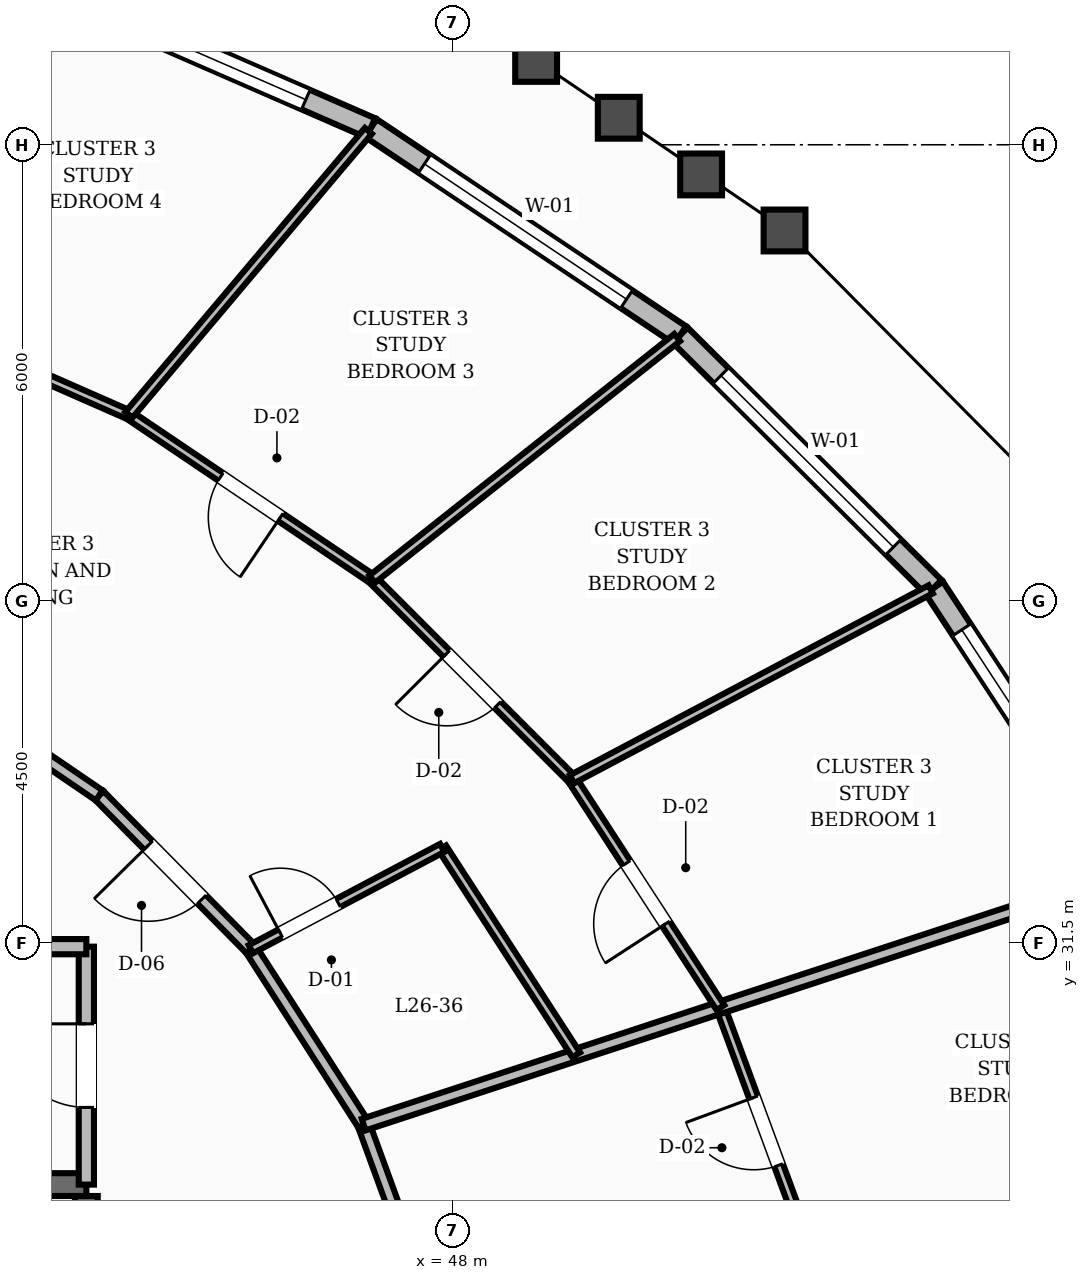
"""IFC4 building model, lengths in metres.
Left out: names, types, materials, properties, quantities, classifications, styles, units other than length and angle.
Written with IfcOpenShell. Run it as: python <this file> out.ifc"""

import sys

from ifc_helpers import new_model, si_unit, direction, frame, frame_2d, origin, place, context, subcontext, project, spatial, rectangle, extrude, element, fill, save


model = new_model("IFC4")
c1 = context("Model", 3, precision=1e-05, world=origin(), true_north=direction((0.0, 1.0)))
c2 = subcontext(c1, "Body", "Model", "MODEL_VIEW")
j1 = project(units=[si_unit("LENGTHUNIT", "METRE"), si_unit("PLANEANGLEUNIT", "RADIAN")], contexts=[c1])
p1 = place(None, origin())
s1 = spatial("IfcSite", under=j1, at=p1, CompositionType="ELEMENT")
p2 = place(p1, origin())
s2 = spatial("IfcBuilding", under=s1, at=p2, CompositionType="ELEMENT")
p3 = place(p2, frame((0.0, 0.0, 102.4)))
s3 = spatial("IfcBuildingStorey", under=s2, at=p3, CompositionType="ELEMENT", Elevation=102.4)
p4 = place(p3, frame((43.18, 19.43, 0.0), z_axis=(0.0, 0.0, 1.0), x_axis=(0.0, 1.0, 0.0)))
e1 = element("IfcWall", 1, at=p4, inside=s3, PredefinedType="SHEAR", context=c2, shape_type="SweptSolid", body=[
    extrude(rectangle(XDim=8.74, YDim=0.3, at=frame_2d((4.37, 0.0))), origin(), (0.0, 0.0, 1.0), 3.6),
])
p5 = place(p3, frame((39.58, 28.32, 0.0), z_axis=(0.0, 0.0, 1.0), x_axis=(1.0, 0.0, 0.0)))
e2 = element("IfcWall", 2, at=p5, inside=s3, PredefinedType="SHEAR", context=c2, shape_type="SweptSolid", body=[
    extrude(rectangle(XDim=3.6, YDim=0.3, at=frame_2d((1.8, 0.0))), origin(), (0.0, 0.0, 1.0), 3.6),
])
p6 = place(p5, frame((1.3, 0.0, 0.0)))
e3 = element("IfcOpeningElement", 3, at=p6, cuts=e2, PredefinedType="OPENING", context=c2, shape_type="SweptSolid", body=[
    extrude(rectangle(XDim=1.1, YDim=2.1, at=frame_2d((0.55, 1.05))), frame((0.0, 0.16, 0.0), z_axis=(0.0, -1.0, 0.0), x_axis=(1.0, 0.0, 0.0)), (0.0, 0.0, 1.0), 0.32),
])
p7 = place(p3, frame((56.815, 32.386, 0.0), z_axis=(0.0, 0.0, 1.0), x_axis=(-0.547989842324, 0.836484986542, 0.0)))
e4 = element("IfcWall", 4, at=p7, inside=s3, PredefinedType="STANDARD", context=c2, shape_type="SweptSolid", body=[
    extrude(rectangle(XDim=4.529, YDim=0.28, at=frame_2d((2.265, 0.0))), origin(), (0.0, 0.0, 1.0), 2.67),
])
p8 = place(p7, frame((0.665, 0.0, 0.8)))
e5 = element("IfcOpeningElement", 5, at=p8, cuts=e4, PredefinedType="OPENING", context=c2, shape_type="SweptSolid", body=[
    extrude(rectangle(XDim=3.2, YDim=1.65, at=frame_2d((1.6, 0.825))), frame((0.0, 0.15, 0.0), z_axis=(0.0, -1.0, 0.0), x_axis=(1.0, 0.0, 0.0)), (0.0, 0.0, 1.0), 0.3),
])
p9 = place(p3, frame((54.333, 36.175, 0.0), z_axis=(0.0, 0.0, 1.0), x_axis=(-0.709177055594, 0.705030427583, 0.0)))
e6 = element("IfcWall", 6, at=p9, inside=s3, PredefinedType="STANDARD", context=c2, shape_type="SweptSolid", body=[
    extrude(rectangle(XDim=4.71, YDim=0.28, at=frame_2d((2.355, 0.0))), origin(), (0.0, 0.0, 1.0), 2.67),
])
p10 = place(p9, frame((0.755, 0.0, 0.8)))
e7 = element("IfcOpeningElement", 7, at=p10, cuts=e6, PredefinedType="OPENING", context=c2, shape_type="SweptSolid", body=[
    extrude(rectangle(XDim=3.2, YDim=1.65, at=frame_2d((1.6, 0.825))), frame((0.0, 0.15, 0.0), z_axis=(0.0, -1.0, 0.0), x_axis=(1.0, 0.0, 0.0)), (0.0, 0.0, 1.0), 0.3),
])
p11 = place(p3, frame((50.993, 39.495, 0.0), z_axis=(0.0, 0.0, 1.0), x_axis=(-0.830936801798, 0.556366813728, 0.0)))
e8 = element("IfcWall", 8, at=p11, inside=s3, PredefinedType="STANDARD", context=c2, shape_type="SweptSolid", body=[
    extrude(rectangle(XDim=4.898, YDim=0.28, at=frame_2d((2.449, 0.0))), origin(), (0.0, 0.0, 1.0), 2.67),
])
p12 = place(p11, frame((0.849, 0.0, 0.8)))
e9 = element("IfcOpeningElement", 9, at=p12, cuts=e8, PredefinedType="OPENING", context=c2, shape_type="SweptSolid", body=[
    extrude(rectangle(XDim=3.2, YDim=1.65, at=frame_2d((1.6, 0.825))), frame((0.0, 0.15, 0.0), z_axis=(0.0, -1.0, 0.0), x_axis=(1.0, 0.0, 0.0)), (0.0, 0.0, 1.0), 0.3),
])
p13 = place(p3, frame((46.922, 42.221, 0.0), z_axis=(0.0, 0.0, 1.0), x_axis=(-0.916638922048, 0.399716257596, 0.0)))
e10 = element("IfcWall", 10, at=p13, inside=s3, PredefinedType="STANDARD", context=c2, shape_type="SweptSolid", body=[
    extrude(rectangle(XDim=5.066, YDim=0.28, at=frame_2d((2.533, 0.0))), origin(), (0.0, 0.0, 1.0), 2.67),
])
p14 = place(p13, frame((0.933, 0.0, 0.8)))
e11 = element("IfcOpeningElement", 11, at=p14, cuts=e10, PredefinedType="OPENING", context=c2, shape_type="SweptSolid", body=[
    extrude(rectangle(XDim=3.2, YDim=1.65, at=frame_2d((1.6, 0.825))), frame((0.0, 0.15, 0.0), z_axis=(0.0, -1.0, 0.0), x_axis=(1.0, 0.0, 0.0)), (0.0, 0.0, 1.0), 0.3),
])
p15 = place(p3, frame((43.18, 28.32, 0.0), z_axis=(0.0, 0.0, 1.0), x_axis=(0.0, 1.0, 0.0)))
e12 = element("IfcWall", 12, at=p15, inside=s3, PredefinedType="SOLIDWALL", context=c2, shape_type="SweptSolid", body=[
    extrude(rectangle(XDim=3.13, YDim=0.2, at=frame_2d((1.565, 0.0))), origin(), (0.0, 0.0, 1.0), 2.67),
])
p16 = place(p15, frame((1.015, 0.0, 0.0)))
e13 = element("IfcOpeningElement", 13, at=p16, cuts=e12, PredefinedType="OPENING", context=c2, shape_type="SweptSolid", body=[
    extrude(rectangle(XDim=1.1, YDim=2.1, at=frame_2d((0.55, 1.05))), frame((0.0, 0.11, 0.0), z_axis=(0.0, -1.0, 0.0), x_axis=(1.0, 0.0, 0.0)), (0.0, 0.0, 1.0), 0.22),
])
p17 = place(p3, frame((39.2, 31.45, 0.0), z_axis=(0.0, 0.0, 1.0), x_axis=(1.0, 0.0, 0.0)))
e14 = element("IfcWall", 14, at=p17, inside=s3, PredefinedType="SOLIDWALL", context=c2, shape_type="SweptSolid", body=[
    extrude(rectangle(XDim=3.98, YDim=0.2, at=frame_2d((1.99, 0.0))), origin(), (0.0, 0.0, 1.0), 2.67),
])
p18 = place(p3, frame((47.742, 26.604, 0.0), z_axis=(0.0, 0.0, 1.0), x_axis=(-0.342617982381, 0.939474809747, 0.0)))
e15 = element("IfcWall", 15, at=p18, inside=s3, PredefinedType="SOLIDWALL", context=c2, shape_type="SweptSolid", body=[
    extrude(rectangle(XDim=2.666, YDim=0.16, at=frame_2d((1.333, 0.0))), origin(), (0.0, 0.0, 1.0), 2.67),
])
p19 = place(p3, frame((46.828, 29.109, 0.0), z_axis=(0.0, 0.0, 1.0), x_axis=(-0.540595670038, 0.841282545603, 0.0)))
e16 = element("IfcWall", 16, at=p19, inside=s3, PredefinedType="SOLIDWALL", context=c2, shape_type="SweptSolid", body=[
    extrude(rectangle(XDim=2.744, YDim=0.16, at=frame_2d((1.372, 0.0))), origin(), (0.0, 0.0, 1.0), 2.67),
])
p20 = place(p3, frame((45.345, 31.417, 0.0), z_axis=(0.0, 0.0, 1.0), x_axis=(-0.702366174226, 0.711815816981, 0.0)))
e17 = element("IfcWall", 17, at=p20, inside=s3, PredefinedType="SOLIDWALL", context=c2, shape_type="SweptSolid", body=[
    extrude(rectangle(XDim=2.842, YDim=0.16, at=frame_2d((1.421, 0.0))), origin(), (0.0, 0.0, 1.0), 2.67),
])
p21 = place(p20, frame((0.921, 0.0, 0.0)))
e18 = element("IfcOpeningElement", 18, at=p21, cuts=e17, PredefinedType="OPENING", context=c2, shape_type="SweptSolid", body=[
    extrude(rectangle(XDim=1.0, YDim=2.1, at=frame_2d((0.5, 1.05))), frame((0.0, 0.09, 0.0), z_axis=(0.0, -1.0, 0.0), x_axis=(1.0, 0.0, 0.0)), (0.0, 0.0, 1.0), 0.18),
])
p22 = place(p3, frame((43.349, 33.44, 0.0), z_axis=(0.0, 0.0, 1.0), x_axis=(-0.825929039072, 0.563774088104, 0.0)))
e19 = element("IfcWall", 19, at=p22, inside=s3, PredefinedType="SOLIDWALL", context=c2, shape_type="SweptSolid", body=[
    extrude(rectangle(XDim=2.945, YDim=0.16, at=frame_2d((1.472, 0.0))), origin(), (0.0, 0.0, 1.0), 2.67),
])
p23 = place(p3, frame((52.725, 27.39, 0.0), z_axis=(0.0, 0.0, 1.0), x_axis=(-0.346151450403, 0.938178646839, 0.0)))
e20 = element("IfcWall", 20, at=p23, inside=s3, PredefinedType="PARTITIONING", context=c2, shape_type="SweptSolid", body=[
    extrude(rectangle(XDim=3.474, YDim=0.12, at=frame_2d((1.737, 0.0))), origin(), (0.0, 0.0, 1.0), 2.67),
])
p24 = place(p23, frame((1.262, 0.0, 0.0)))
e21 = element("IfcOpeningElement", 21, at=p24, cuts=e20, PredefinedType="OPENING", context=c2, shape_type="SweptSolid", body=[
    extrude(rectangle(XDim=0.95, YDim=2.1, at=frame_2d((0.475, 1.05))), frame((0.0, 0.07, 0.0), z_axis=(0.0, -1.0, 0.0), x_axis=(1.0, 0.0, 0.0)), (0.0, 0.0, 1.0), 0.14),
])
p25 = place(p3, frame((52.725, 27.39, 0.0), z_axis=(0.0, 0.0, 1.0), x_axis=(0.987809965593, 0.155664613436, 0.0)))
e22 = element("IfcWall", 22, at=p25, inside=s3, PredefinedType="PARTITIONING", context=c2, shape_type="SweptSolid", body=[
    extrude(rectangle(XDim=5.638, YDim=0.12, at=frame_2d((2.819, 0.0))), origin(), (0.0, 0.0, 1.0), 2.67),
])
p26 = place(p3, frame((46.828, 29.109, 0.0), z_axis=(0.0, 0.0, 1.0), x_axis=(0.95015260274, 0.311785232984, 0.0)))
e23 = element("IfcWall", 23, at=p26, inside=s3, PredefinedType="SOLIDWALL", context=c2, shape_type="SweptSolid", body=[
    extrude(rectangle(XDim=10.461, YDim=0.16, at=frame_2d((5.23, 0.0))), origin(), (0.0, 0.0, 1.0), 2.67),
])
p27 = place(p3, frame((49.625, 30.026, 0.0), z_axis=(0.0, 0.0, 1.0), x_axis=(-0.543463490986, 0.839432804914, 0.0)))
e24 = element("IfcWall", 24, at=p27, inside=s3, PredefinedType="PARTITIONING", context=c2, shape_type="SweptSolid", body=[
    extrude(rectangle(XDim=3.243, YDim=0.12, at=frame_2d((1.622, 0.0))), origin(), (0.0, 0.0, 1.0), 2.67),
])
p28 = place(p3, frame((45.345, 31.417, 0.0), z_axis=(0.0, 0.0, 1.0), x_axis=(0.883829625211, 0.467808928517, 0.0)))
e25 = element("IfcWall", 25, at=p28, inside=s3, PredefinedType="PARTITIONING", context=c2, shape_type="SweptSolid", body=[
    extrude(rectangle(XDim=2.847, YDim=0.12, at=frame_2d((1.424, 0.0))), origin(), (0.0, 0.0, 1.0), 2.67),
])
p29 = place(p28, frame((0.44, 0.0, 0.0)))
e26 = element("IfcOpeningElement", 26, at=p29, cuts=e25, PredefinedType="OPENING", context=c2, shape_type="SweptSolid", body=[
    extrude(rectangle(XDim=0.86, YDim=2.1, at=frame_2d((0.43, 1.05))), frame((0.0, 0.07, 0.0), z_axis=(0.0, -1.0, 0.0), x_axis=(1.0, 0.0, 0.0)), (0.0, 0.0, 1.0), 0.14),
])
p30 = place(p3, frame((51.522, 30.649, 0.0), z_axis=(0.0, 0.0, 1.0), x_axis=(-0.545007511922, 0.838431161127, 0.0)))
e27 = element("IfcWall", 27, at=p30, inside=s3, PredefinedType="PARTITIONING", context=c2, shape_type="SweptSolid", body=[
    extrude(rectangle(XDim=3.583, YDim=0.12, at=frame_2d((1.792, 0.0))), origin(), (0.0, 0.0, 1.0), 2.67),
])
p31 = place(p30, frame((1.316, 0.0, 0.0)))
e28 = element("IfcOpeningElement", 28, at=p31, cuts=e27, PredefinedType="OPENING", context=c2, shape_type="SweptSolid", body=[
    extrude(rectangle(XDim=0.95, YDim=2.1, at=frame_2d((0.475, 1.05))), frame((0.0, 0.07, 0.0), z_axis=(0.0, -1.0, 0.0), x_axis=(1.0, 0.0, 0.0)), (0.0, 0.0, 1.0), 0.14),
])
p32 = place(p3, frame((49.569, 33.653, 0.0), z_axis=(0.0, 0.0, 1.0), x_axis=(-0.706450168387, 0.707762784827, 0.0)))
e29 = element("IfcWall", 29, at=p32, inside=s3, PredefinedType="PARTITIONING", context=c2, shape_type="SweptSolid", body=[
    extrude(rectangle(XDim=3.72, YDim=0.12, at=frame_2d((1.86, 0.0))), origin(), (0.0, 0.0, 1.0), 2.67),
])
p33 = place(p32, frame((1.385, 0.0, 0.0)))
e30 = element("IfcOpeningElement", 30, at=p33, cuts=e29, PredefinedType="OPENING", context=c2, shape_type="SweptSolid", body=[
    extrude(rectangle(XDim=0.95, YDim=2.1, at=frame_2d((0.475, 1.05))), frame((0.0, 0.07, 0.0), z_axis=(0.0, -1.0, 0.0), x_axis=(1.0, 0.0, 0.0)), (0.0, 0.0, 1.0), 0.14),
])
p34 = place(p3, frame((49.569, 33.653, 0.0), z_axis=(0.0, 0.0, 1.0), x_axis=(0.883826837668, 0.467814194973, 0.0)))
e31 = element("IfcWall", 31, at=p34, inside=s3, PredefinedType="PARTITIONING", context=c2, shape_type="SweptSolid", body=[
    extrude(rectangle(XDim=5.34, YDim=0.12, at=frame_2d((2.67, 0.0))), origin(), (0.0, 0.0, 1.0), 2.67),
])
p35 = place(p3, frame((46.941, 36.286, 0.0), z_axis=(0.0, 0.0, 1.0), x_axis=(-0.828896296571, 0.55940229668, 0.0)))
e32 = element("IfcWall", 32, at=p35, inside=s3, PredefinedType="PARTITIONING", context=c2, shape_type="SweptSolid", body=[
    extrude(rectangle(XDim=3.863, YDim=0.12, at=frame_2d((1.931, 0.0))), origin(), (0.0, 0.0, 1.0), 2.67),
])
p36 = place(p35, frame((1.456, 0.0, 0.0)))
e33 = element("IfcOpeningElement", 33, at=p36, cuts=e32, PredefinedType="OPENING", context=c2, shape_type="SweptSolid", body=[
    extrude(rectangle(XDim=0.95, YDim=2.1, at=frame_2d((0.475, 1.05))), frame((0.0, 0.07, 0.0), z_axis=(0.0, -1.0, 0.0), x_axis=(1.0, 0.0, 0.0)), (0.0, 0.0, 1.0), 0.14),
])
p37 = place(p3, frame((46.941, 36.286, 0.0), z_axis=(0.0, 0.0, 1.0), x_axis=(0.783824285958, 0.620982679905, 0.0)))
e34 = element("IfcWall", 34, at=p37, inside=s3, PredefinedType="PARTITIONING", context=c2, shape_type="SweptSolid", body=[
    extrude(rectangle(XDim=5.118, YDim=0.12, at=frame_2d((2.559, 0.0))), origin(), (0.0, 0.0, 1.0), 2.67),
])
p38 = place(p3, frame((43.74, 38.447, 0.0), z_axis=(0.0, 0.0, 1.0), x_axis=(-0.915498969217, 0.402320316865, 0.0)))
e35 = element("IfcWall", 35, at=p38, inside=s3, PredefinedType="PARTITIONING", context=c2, shape_type="SweptSolid", body=[
    extrude(rectangle(XDim=3.99, YDim=0.12, at=frame_2d((1.995, 0.0))), origin(), (0.0, 0.0, 1.0), 2.67),
])
p39 = place(p38, frame((1.52, 0.0, 0.0)))
e36 = element("IfcOpeningElement", 36, at=p39, cuts=e35, PredefinedType="OPENING", context=c2, shape_type="SweptSolid", body=[
    extrude(rectangle(XDim=0.95, YDim=2.1, at=frame_2d((0.475, 1.05))), frame((0.0, 0.07, 0.0), z_axis=(0.0, -1.0, 0.0), x_axis=(1.0, 0.0, 0.0)), (0.0, 0.0, 1.0), 0.14),
])
p40 = place(p3, frame((43.74, 38.447, 0.0), z_axis=(0.0, 0.0, 1.0), x_axis=(0.644718627515, 0.764419970524, 0.0)))
e37 = element("IfcWall", 37, at=p40, inside=s3, PredefinedType="PARTITIONING", context=c2, shape_type="SweptSolid", body=[
    extrude(rectangle(XDim=4.887, YDim=0.12, at=frame_2d((2.443, 0.0))), origin(), (0.0, 0.0, 1.0), 2.67),
])
p41 = place(p8, origin())
e38 = element("IfcWindow", 38, at=p41, inside=s3, PartitioningType="SINGLE_PANEL", PredefinedType="WINDOW", context=c2, shape_type="SweptSolid", body=[
    extrude(rectangle(XDim=3.2, YDim=1.65, at=frame_2d((1.6, 0.825))), frame((0.0, 0.03, 0.0), z_axis=(0.0, -1.0, 0.0), x_axis=(1.0, 0.0, 0.0)), (0.0, 0.0, 1.0), 0.06),
])
fill(e5, e38)
p42 = place(p10, origin())
e39 = element("IfcWindow", 39, at=p42, inside=s3, PartitioningType="SINGLE_PANEL", PredefinedType="WINDOW", context=c2, shape_type="SweptSolid", body=[
    extrude(rectangle(XDim=3.2, YDim=1.65, at=frame_2d((1.6, 0.825))), frame((0.0, 0.03, 0.0), z_axis=(0.0, -1.0, 0.0), x_axis=(1.0, 0.0, 0.0)), (0.0, 0.0, 1.0), 0.06),
])
fill(e7, e39)
p43 = place(p12, origin())
e40 = element("IfcWindow", 40, at=p43, inside=s3, PartitioningType="SINGLE_PANEL", PredefinedType="WINDOW", context=c2, shape_type="SweptSolid", body=[
    extrude(rectangle(XDim=3.2, YDim=1.65, at=frame_2d((1.6, 0.825))), frame((0.0, 0.03, 0.0), z_axis=(0.0, -1.0, 0.0), x_axis=(1.0, 0.0, 0.0)), (0.0, 0.0, 1.0), 0.06),
])
fill(e9, e40)
p44 = place(p14, origin())
e41 = element("IfcWindow", 41, at=p44, inside=s3, PartitioningType="SINGLE_PANEL", PredefinedType="WINDOW", context=c2, shape_type="SweptSolid", body=[
    extrude(rectangle(XDim=3.2, YDim=1.65, at=frame_2d((1.6, 0.825))), frame((0.0, 0.03, 0.0), z_axis=(0.0, -1.0, 0.0), x_axis=(1.0, 0.0, 0.0)), (0.0, 0.0, 1.0), 0.06),
])
fill(e11, e41)
p45 = place(p16, origin())
e42 = element("IfcDoor", 42, at=p45, inside=s3, OperationType="SINGLE_SWING_RIGHT", PredefinedType="DOOR", context=c2, shape_type="SweptSolid", body=[
    extrude(rectangle(XDim=1.1, YDim=2.1, at=frame_2d((0.55, 1.05))), frame((0.0, 0.025, 0.0), z_axis=(0.0, -1.0, 0.0), x_axis=(1.0, 0.0, 0.0)), (0.0, 0.0, 1.0), 0.05),
])
fill(e13, e42)
p46 = place(p24, origin())
e43 = element("IfcDoor", 43, at=p46, inside=s3, OperationType="SINGLE_SWING_RIGHT", PredefinedType="DOOR", context=c2, shape_type="SweptSolid", body=[
    extrude(rectangle(XDim=0.95, YDim=2.1, at=frame_2d((0.475, 1.05))), frame((0.0, 0.025, 0.0), z_axis=(0.0, -1.0, 0.0), x_axis=(1.0, 0.0, 0.0)), (0.0, 0.0, 1.0), 0.05),
])
fill(e21, e43)
p47 = place(p29, origin())
e44 = element("IfcDoor", 44, at=p47, inside=s3, OperationType="SINGLE_SWING_LEFT", PredefinedType="DOOR", context=c2, shape_type="SweptSolid", body=[
    extrude(rectangle(XDim=0.86, YDim=2.1, at=frame_2d((0.43, 1.05))), frame((0.0, 0.025, 0.0), z_axis=(0.0, -1.0, 0.0), x_axis=(1.0, 0.0, 0.0)), (0.0, 0.0, 1.0), 0.05),
])
fill(e26, e44)
p48 = place(p21, origin())
e45 = element("IfcDoor", 45, at=p48, inside=s3, OperationType="SINGLE_SWING_RIGHT", PredefinedType="DOOR", context=c2, shape_type="SweptSolid", body=[
    extrude(rectangle(XDim=1.0, YDim=2.1, at=frame_2d((0.5, 1.05))), frame((0.0, 0.025, 0.0), z_axis=(0.0, -1.0, 0.0), x_axis=(1.0, 0.0, 0.0)), (0.0, 0.0, 1.0), 0.05),
])
fill(e18, e45)
p49 = place(p31, origin())
e46 = element("IfcDoor", 46, at=p49, inside=s3, OperationType="SINGLE_SWING_LEFT", PredefinedType="DOOR", context=c2, shape_type="SweptSolid", body=[
    extrude(rectangle(XDim=0.95, YDim=2.1, at=frame_2d((0.475, 1.05))), frame((0.0, 0.025, 0.0), z_axis=(0.0, -1.0, 0.0), x_axis=(1.0, 0.0, 0.0)), (0.0, 0.0, 1.0), 0.05),
])
fill(e28, e46)
p50 = place(p33, origin())
e47 = element("IfcDoor", 47, at=p50, inside=s3, OperationType="SINGLE_SWING_RIGHT", PredefinedType="DOOR", context=c2, shape_type="SweptSolid", body=[
    extrude(rectangle(XDim=0.95, YDim=2.1, at=frame_2d((0.475, 1.05))), frame((0.0, 0.025, 0.0), z_axis=(0.0, -1.0, 0.0), x_axis=(1.0, 0.0, 0.0)), (0.0, 0.0, 1.0), 0.05),
])
fill(e30, e47)
p51 = place(p36, origin())
e48 = element("IfcDoor", 48, at=p51, inside=s3, OperationType="SINGLE_SWING_LEFT", PredefinedType="DOOR", context=c2, shape_type="SweptSolid", body=[
    extrude(rectangle(XDim=0.95, YDim=2.1, at=frame_2d((0.475, 1.05))), frame((0.0, 0.025, 0.0), z_axis=(0.0, -1.0, 0.0), x_axis=(1.0, 0.0, 0.0)), (0.0, 0.0, 1.0), 0.05),
])
fill(e33, e48)
save(model, sys.argv[1])
